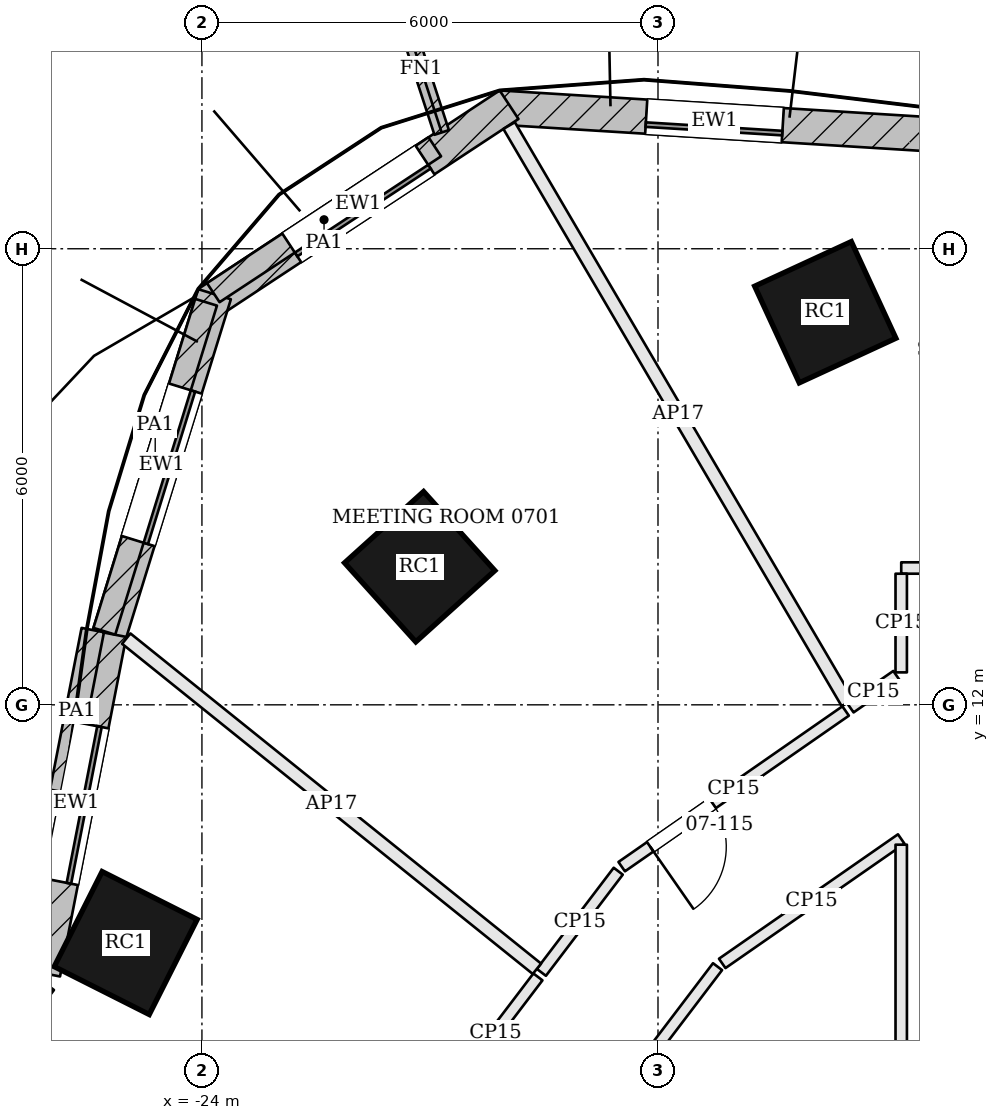
"""IFC4 building model, lengths in metres.
Left out: names, types, materials, properties, quantities, classifications, styles, units other than length and angle.
Written with IfcOpenShell. Run it as: python <this file> out.ifc"""

import sys

from ifc_helpers import new_model, si_unit, direction, frame, frame_2d, origin, origin_2d, place, context, subcontext, project, spatial, rectangle, extrude, element, fill, save


model = new_model("IFC4")
c1 = context("Model", 3, precision=1e-05, world=origin(), true_north=direction((0.0, 1.0)))
c2 = subcontext(c1, "Body", "Model", "MODEL_VIEW")
j1 = project(units=[si_unit("LENGTHUNIT", "METRE"), si_unit("PLANEANGLEUNIT", "RADIAN")], contexts=[c1])
p1 = place(None, origin())
s1 = spatial("IfcSite", under=j1, at=p1, CompositionType="ELEMENT")
p2 = place(p1, origin())
s2 = spatial("IfcBuilding", under=s1, at=p2, CompositionType="ELEMENT")
p3 = place(p2, frame((0.0, 0.0, 41.1)))
s3 = spatial("IfcBuildingStorey", under=s2, at=p3, CompositionType="ELEMENT", Elevation=41.1)
for number, where, z_axis, x_axis in (
    (1, (-15.799, 17.165, 0.0), (0.0, 0.0, 1.0), (-0.908, -0.419, 0.0)),
    (2, (-21.135, 13.817, 0.0), (0.0, 0.0, 1.0), (-0.743, -0.67, 0.0)),
    (3, (-25.003, 8.866, 0.0), (0.0, 0.0, 1.0), (-0.45, -0.893, 0.0)),
):
    element("IfcColumn", number, at=place(p3, frame(where, z_axis=z_axis, x_axis=x_axis)), inside=s3, PredefinedType="COLUMN", context=c2, shape_type="SweptSolid", body=[
        extrude(rectangle(XDim=1.4, YDim=1.4, at=origin_2d()), origin(), (0.0, 0.0, 1.0), 3.6),
    ])
p4 = place(p3, frame((-14.421, 19.506, 0.0), z_axis=(0.0, 0.0, 1.0), x_axis=(-0.998078573447, 0.06196096534, 0.0)))
e4 = element("IfcWall", 4, at=p4, inside=s3, PredefinedType="SOLIDWALL", context=c2, shape_type="SweptSolid", body=[
    extrude(rectangle(XDim=5.682, YDim=0.45, at=frame_2d((2.841, 0.0))), origin(), (0.0, 0.0, 1.0), 3.4),
])
p5 = place(p4, frame((1.941, 0.0, 0.9)))
e5 = element("IfcOpeningElement", 5, at=p5, cuts=e4, PredefinedType="OPENING", context=c2, shape_type="SweptSolid", body=[
    extrude(rectangle(XDim=1.8, YDim=2.0, at=frame_2d((0.9, 1.0))), frame((0.0, 0.235, 0.0), z_axis=(0.0, -1.0, 0.0), x_axis=(1.0, 0.0, 0.0)), (0.0, 0.0, 1.0), 0.47),
])
p6 = place(p3, frame((-19.959, 19.895, 0.0), z_axis=(0.0, 0.0, 1.0), x_axis=(-0.835201398752, -0.549944200372, 0.0)))
e6 = element("IfcWall", 6, at=p6, inside=s3, PredefinedType="SOLIDWALL", context=c2, shape_type="SweptSolid", body=[
    extrude(rectangle(XDim=4.748, YDim=0.45, at=frame_2d((2.374, 0.0))), origin(), (0.0, 0.0, 1.0), 3.4),
])
p7 = place(p6, frame((1.324, 0.0, 0.9)))
e7 = element("IfcOpeningElement", 7, at=p7, cuts=e6, PredefinedType="OPENING", context=c2, shape_type="SweptSolid", body=[
    extrude(rectangle(XDim=2.1, YDim=2.0, at=frame_2d((1.05, 1.0))), frame((0.0, 0.235, 0.0), z_axis=(0.0, -1.0, 0.0), x_axis=(1.0, 0.0, 0.0)), (0.0, 0.0, 1.0), 0.47),
])
p8 = place(p3, frame((-23.834, 17.402, 0.0), z_axis=(0.0, 0.0, 1.0), x_axis=(-0.2954658114, -0.955353313855, 0.0)))
e8 = element("IfcWall", 8, at=p8, inside=s3, PredefinedType="SOLIDWALL", context=c2, shape_type="SweptSolid", body=[
    extrude(rectangle(XDim=4.698, YDim=0.45, at=frame_2d((2.349, 0.0))), origin(), (0.0, 0.0, 1.0), 3.4),
])
p9 = place(p8, frame((1.299, 0.0, 0.9)))
e9 = element("IfcOpeningElement", 9, at=p9, cuts=e8, PredefinedType="OPENING", context=c2, shape_type="SweptSolid", body=[
    extrude(rectangle(XDim=2.1, YDim=2.0, at=frame_2d((1.05, 1.0))), frame((0.0, 0.235, 0.0), z_axis=(0.0, -1.0, 0.0), x_axis=(1.0, 0.0, 0.0)), (0.0, 0.0, 1.0), 0.47),
])
p10 = place(p3, frame((-25.216, 12.936, 0.0), z_axis=(0.0, 0.0, 1.0), x_axis=(-0.191564556994, -0.981480015336, 0.0)))
e10 = element("IfcWall", 10, at=p10, inside=s3, PredefinedType="SOLIDWALL", context=c2, shape_type="SweptSolid", body=[
    extrude(rectangle(XDim=4.551, YDim=0.45, at=frame_2d((2.275, 0.0))), origin(), (0.0, 0.0, 1.0), 3.4),
])
p11 = place(p10, frame((1.226, 0.0, 0.9)))
e11 = element("IfcOpeningElement", 11, at=p11, cuts=e10, PredefinedType="OPENING", context=c2, shape_type="SweptSolid", body=[
    extrude(rectangle(XDim=2.1, YDim=2.0, at=frame_2d((1.05, 1.0))), frame((0.0, 0.235, 0.0), z_axis=(0.0, -1.0, 0.0), x_axis=(1.0, 0.0, 0.0)), (0.0, 0.0, 1.0), 0.47),
])
p12 = place(p3, frame((-26.126, 8.384, 0.0), z_axis=(0.0, 0.0, 1.0), x_axis=(-0.602408101465, -0.798188248028, 0.0)))
e12 = element("IfcWall", 12, at=p12, inside=s3, PredefinedType="SOLIDWALL", context=c2, shape_type="SweptSolid", body=[
    extrude(rectangle(XDim=4.909, YDim=0.45, at=frame_2d((2.455, 0.0))), origin(), (0.0, 0.0, 1.0), 3.4),
])
p13 = place(p12, frame((1.405, 0.0, 0.9)))
e13 = element("IfcOpeningElement", 13, at=p13, cuts=e12, PredefinedType="OPENING", context=c2, shape_type="SweptSolid", body=[
    extrude(rectangle(XDim=2.1, YDim=2.0, at=frame_2d((1.05, 1.0))), frame((0.0, 0.235, 0.0), z_axis=(0.0, -1.0, 0.0), x_axis=(1.0, 0.0, 0.0)), (0.0, 0.0, 1.0), 0.47),
])
p14 = place(p3, frame((-20.846, 19.53, 0.0), z_axis=(0.0, 0.0, 1.0), x_axis=(-0.309732726603, 0.950823662974, 0.0)))
e14 = element("IfcWall", 14, at=p14, inside=s3, PredefinedType="SOLIDWALL", context=c2, shape_type="SweptSolid", body=[
    extrude(rectangle(XDim=1.75, YDim=0.2, at=frame_2d((0.875, 0.0))), origin(), (0.0, 0.0, 1.0), 3.4),
])
p15 = place(p3, frame((-20.936, 19.342, 3.6), z_axis=(0.0, 0.0, 1.0), x_axis=(-0.835169297141, -0.549992950057, 0.0)))
e15 = element("IfcWall", 15, at=p15, inside=s3, PredefinedType="PARAPET", context=c2, shape_type="SweptSolid", body=[
    extrude(rectangle(XDim=3.49, YDim=0.3, at=frame_2d((1.745, 0.0))), origin(), (0.0, 0.0, 1.0), 1.1),
])
p16 = place(p3, frame((-23.945, 17.296, 3.6), z_axis=(0.0, 0.0, 1.0), x_axis=(-0.29546008929, -0.955355083535, 0.0)))
e16 = element("IfcWall", 16, at=p16, inside=s3, PredefinedType="PARAPET", context=c2, shape_type="SweptSolid", body=[
    extrude(rectangle(XDim=4.531, YDim=0.3, at=frame_2d((2.265, 0.0))), origin(), (0.0, 0.0, 1.0), 1.1),
])
p17 = place(p3, frame((-25.436, 12.983, 3.6), z_axis=(0.0, 0.0, 1.0), x_axis=(-0.191565926717, -0.981479747993, 0.0)))
e17 = element("IfcWall", 17, at=p17, inside=s3, PredefinedType="PARAPET", context=c2, shape_type="SweptSolid", body=[
    extrude(rectangle(XDim=2.168, YDim=0.3, at=frame_2d((1.084, 0.0))), origin(), (0.0, 0.0, 1.0), 1.1),
])
p18 = place(p3, frame((-11.464, 13.8, 0.0), z_axis=(0.0, 0.0, 1.0), x_axis=(-1.0, 0.0, 0.0)))
e18 = element("IfcWall", 18, at=p18, inside=s3, PredefinedType="PARTITIONING", context=c2, shape_type="SweptSolid", body=[
    extrude(rectangle(XDim=3.336, YDim=0.15, at=frame_2d((1.668, 0.0))), origin(), (0.0, 0.0, 1.0), 2.68),
])
p19 = place(p18, frame((0.3, 0.0, 0.0)))
e19 = element("IfcOpeningElement", 19, at=p19, cuts=e18, PredefinedType="OPENING", context=c2, shape_type="SweptSolid", body=[
    extrude(rectangle(XDim=1.0, YDim=2.1, at=frame_2d((0.5, 1.05))), frame((0.0, 0.085, 0.0), z_axis=(0.0, -1.0, 0.0), x_axis=(1.0, 0.0, 0.0)), (0.0, 0.0, 1.0), 0.17),
])
p20 = place(p3, frame((-14.8, 13.725, 0.0), z_axis=(0.0, 0.0, 1.0), x_axis=(-0.000188040613, -0.99999998232, 0.0)))
e20 = element("IfcWall", 20, at=p20, inside=s3, PredefinedType="PARTITIONING", context=c2, shape_type="SweptSolid", body=[
    extrude(rectangle(XDim=1.298, YDim=0.15, at=frame_2d((0.649, 0.0))), origin(), (0.0, 0.0, 1.0), 2.68),
])
p21 = place(p3, frame((-14.862, 12.384, 0.0), z_axis=(0.0, 0.0, 1.0), x_axis=(-0.821086629872, -0.570803596911, 0.0)))
e21 = element("IfcWall", 21, at=p21, inside=s3, PredefinedType="PARTITIONING", context=c2, shape_type="SweptSolid", body=[
    extrude(rectangle(XDim=0.74, YDim=0.15, at=frame_2d((0.37, 0.0))), origin(), (0.0, 0.0, 1.0), 2.68),
])
p22 = place(p3, frame((-19.958, 19.62, 0.0), z_axis=(0.0, 0.0, 1.0), x_axis=(0.505625538269, -0.862753044069, 0.0)))
e22 = element("IfcWall", 22, at=p22, inside=s3, PredefinedType="PARTITIONING", context=c2, shape_type="SweptSolid", body=[
    extrude(rectangle(XDim=8.802, YDim=0.175, at=frame_2d((4.401, 0.0))), origin(), (0.0, 0.0, 1.0), 2.68),
])
p23 = place(p3, frame((-15.531, 11.919, 0.0), z_axis=(0.0, 0.0, 1.0), x_axis=(-0.821142304153, -0.570723502522, 0.0)))
e23 = element("IfcWall", 23, at=p23, inside=s3, PredefinedType="PARTITIONING", context=c2, shape_type="SweptSolid", body=[
    extrude(rectangle(XDim=3.588, YDim=0.15, at=frame_2d((1.794, 0.0))), origin(), (0.0, 0.0, 1.0), 2.68),
])
p24 = place(p23, frame((2.13, 0.0, 0.0)))
e24 = element("IfcOpeningElement", 24, at=p24, cuts=e23, PredefinedType="OPENING", context=c2, shape_type="SweptSolid", body=[
    extrude(rectangle(XDim=1.0, YDim=2.4, at=frame_2d((0.5, 1.2))), frame((0.0, 0.085, 0.0), z_axis=(0.0, -1.0, 0.0), x_axis=(1.0, 0.0, 0.0)), (0.0, 0.0, 1.0), 0.17),
])
p25 = place(p3, frame((-18.523, 9.811, 0.0), z_axis=(0.0, 0.0, 1.0), x_axis=(-0.605012897814, -0.796215670204, 0.0)))
e25 = element("IfcWall", 25, at=p25, inside=s3, PredefinedType="PARTITIONING", context=c2, shape_type="SweptSolid", body=[
    extrude(rectangle(XDim=1.671, YDim=0.15, at=frame_2d((0.836, 0.0))), origin(), (0.0, 0.0, 1.0), 2.68),
])
p26 = place(p3, frame((-24.996, 12.871, 0.0), z_axis=(0.0, 0.0, 1.0), x_axis=(0.779371961482, -0.626561525835, 0.0)))
e26 = element("IfcWall", 26, at=p26, inside=s3, PredefinedType="PARTITIONING", context=c2, shape_type="SweptSolid", body=[
    extrude(rectangle(XDim=6.932, YDim=0.175, at=frame_2d((3.466, 0.0))), origin(), (0.0, 0.0, 1.0), 2.68),
])
p27 = place(p3, frame((-19.58, 8.421, 0.0), z_axis=(0.0, 0.0, 1.0), x_axis=(-0.605079905314, -0.796164749399, 0.0)))
e27 = element("IfcWall", 27, at=p27, inside=s3, PredefinedType="PARTITIONING", context=c2, shape_type="SweptSolid", body=[
    extrude(rectangle(XDim=1.841, YDim=0.15, at=frame_2d((0.92, 0.0))), origin(), (0.0, 0.0, 1.0), 2.68),
])
p28 = place(p3, frame((-19.056, 6.135, 0.0), z_axis=(0.0, 0.0, 1.0), x_axis=(0.604999774258, 0.796225642107, 0.0)))
e28 = element("IfcWall", 28, at=p28, inside=s3, PredefinedType="PARTITIONING", context=c2, shape_type="SweptSolid", body=[
    extrude(rectangle(XDim=3.04, YDim=0.15, at=frame_2d((1.52, 0.0))), origin(), (0.0, 0.0, 1.0), 2.68),
])
p29 = place(p3, frame((-17.155, 8.598, 0.0), z_axis=(0.0, 0.0, 1.0), x_axis=(0.821087350938, 0.570802559673, 0.0)))
e29 = element("IfcWall", 29, at=p29, inside=s3, PredefinedType="PARTITIONING", context=c2, shape_type="SweptSolid", body=[
    extrude(rectangle(XDim=2.868, YDim=0.15, at=frame_2d((1.434, 0.0))), origin(), (0.0, 0.0, 1.0), 2.68),
])
p30 = place(p3, frame((-14.8, 10.16, 0.0), z_axis=(0.0, 0.0, 1.0), x_axis=(0.0, -1.0, 0.0)))
e30 = element("IfcWall", 30, at=p30, inside=s3, PredefinedType="PARTITIONING", context=c2, shape_type="SweptSolid", body=[
    extrude(rectangle(XDim=14.96, YDim=0.15, at=frame_2d((7.48, 0.0))), origin(), (0.0, 0.0, 1.0), 2.68),
])
p31 = place(p30, frame((6.542, 0.0, 0.0)))
e31 = element("IfcOpeningElement", 31, at=p31, cuts=e30, PredefinedType="OPENING", context=c2, shape_type="SweptSolid", body=[
    extrude(rectangle(XDim=1.8, YDim=2.1, at=frame_2d((0.9, 1.05))), frame((0.0, 0.085, 0.0), z_axis=(0.0, -1.0, 0.0), x_axis=(1.0, 0.0, 0.0)), (0.0, 0.0, 1.0), 0.17),
])
p32 = place(p5, origin())
e32 = element("IfcWindow", 32, at=p32, inside=s3, PartitioningType="SINGLE_PANEL", PredefinedType="WINDOW", context=c2, shape_type="SweptSolid", body=[
    extrude(rectangle(XDim=1.8, YDim=2.0, at=frame_2d((0.9, 1.0))), frame((0.0, 0.135, 0.0), z_axis=(0.0, -1.0, 0.0), x_axis=(1.0, 0.0, 0.0)), (0.0, 0.0, 1.0), 0.06),
])
fill(e5, e32)
p33 = place(p7, origin())
e33 = element("IfcWindow", 33, at=p33, inside=s3, PartitioningType="SINGLE_PANEL", PredefinedType="WINDOW", context=c2, shape_type="SweptSolid", body=[
    extrude(rectangle(XDim=2.1, YDim=2.0, at=frame_2d((1.05, 1.0))), frame((0.0, 0.135, 0.0), z_axis=(0.0, -1.0, 0.0), x_axis=(1.0, 0.0, 0.0)), (0.0, 0.0, 1.0), 0.06),
])
fill(e7, e33)
p34 = place(p9, origin())
e34 = element("IfcWindow", 34, at=p34, inside=s3, PartitioningType="SINGLE_PANEL", PredefinedType="WINDOW", context=c2, shape_type="SweptSolid", body=[
    extrude(rectangle(XDim=2.1, YDim=2.0, at=frame_2d((1.05, 1.0))), frame((0.0, 0.135, 0.0), z_axis=(0.0, -1.0, 0.0), x_axis=(1.0, 0.0, 0.0)), (0.0, 0.0, 1.0), 0.06),
])
fill(e9, e34)
p35 = place(p11, origin())
e35 = element("IfcWindow", 35, at=p35, inside=s3, PartitioningType="SINGLE_PANEL", PredefinedType="WINDOW", context=c2, shape_type="SweptSolid", body=[
    extrude(rectangle(XDim=2.1, YDim=2.0, at=frame_2d((1.05, 1.0))), frame((0.0, 0.135, 0.0), z_axis=(0.0, -1.0, 0.0), x_axis=(1.0, 0.0, 0.0)), (0.0, 0.0, 1.0), 0.06),
])
fill(e11, e35)
p36 = place(p24, origin())
e36 = element("IfcDoor", 36, at=p36, inside=s3, OperationType="SINGLE_SWING_RIGHT", PredefinedType="DOOR", context=c2, shape_type="SweptSolid", body=[
    extrude(rectangle(XDim=1.0, YDim=2.4, at=frame_2d((0.5, 1.2))), frame((0.0, 0.025, 0.0), z_axis=(0.0, -1.0, 0.0), x_axis=(1.0, 0.0, 0.0)), (0.0, 0.0, 1.0), 0.05),
])
fill(e24, e36)
save(model, sys.argv[1])
